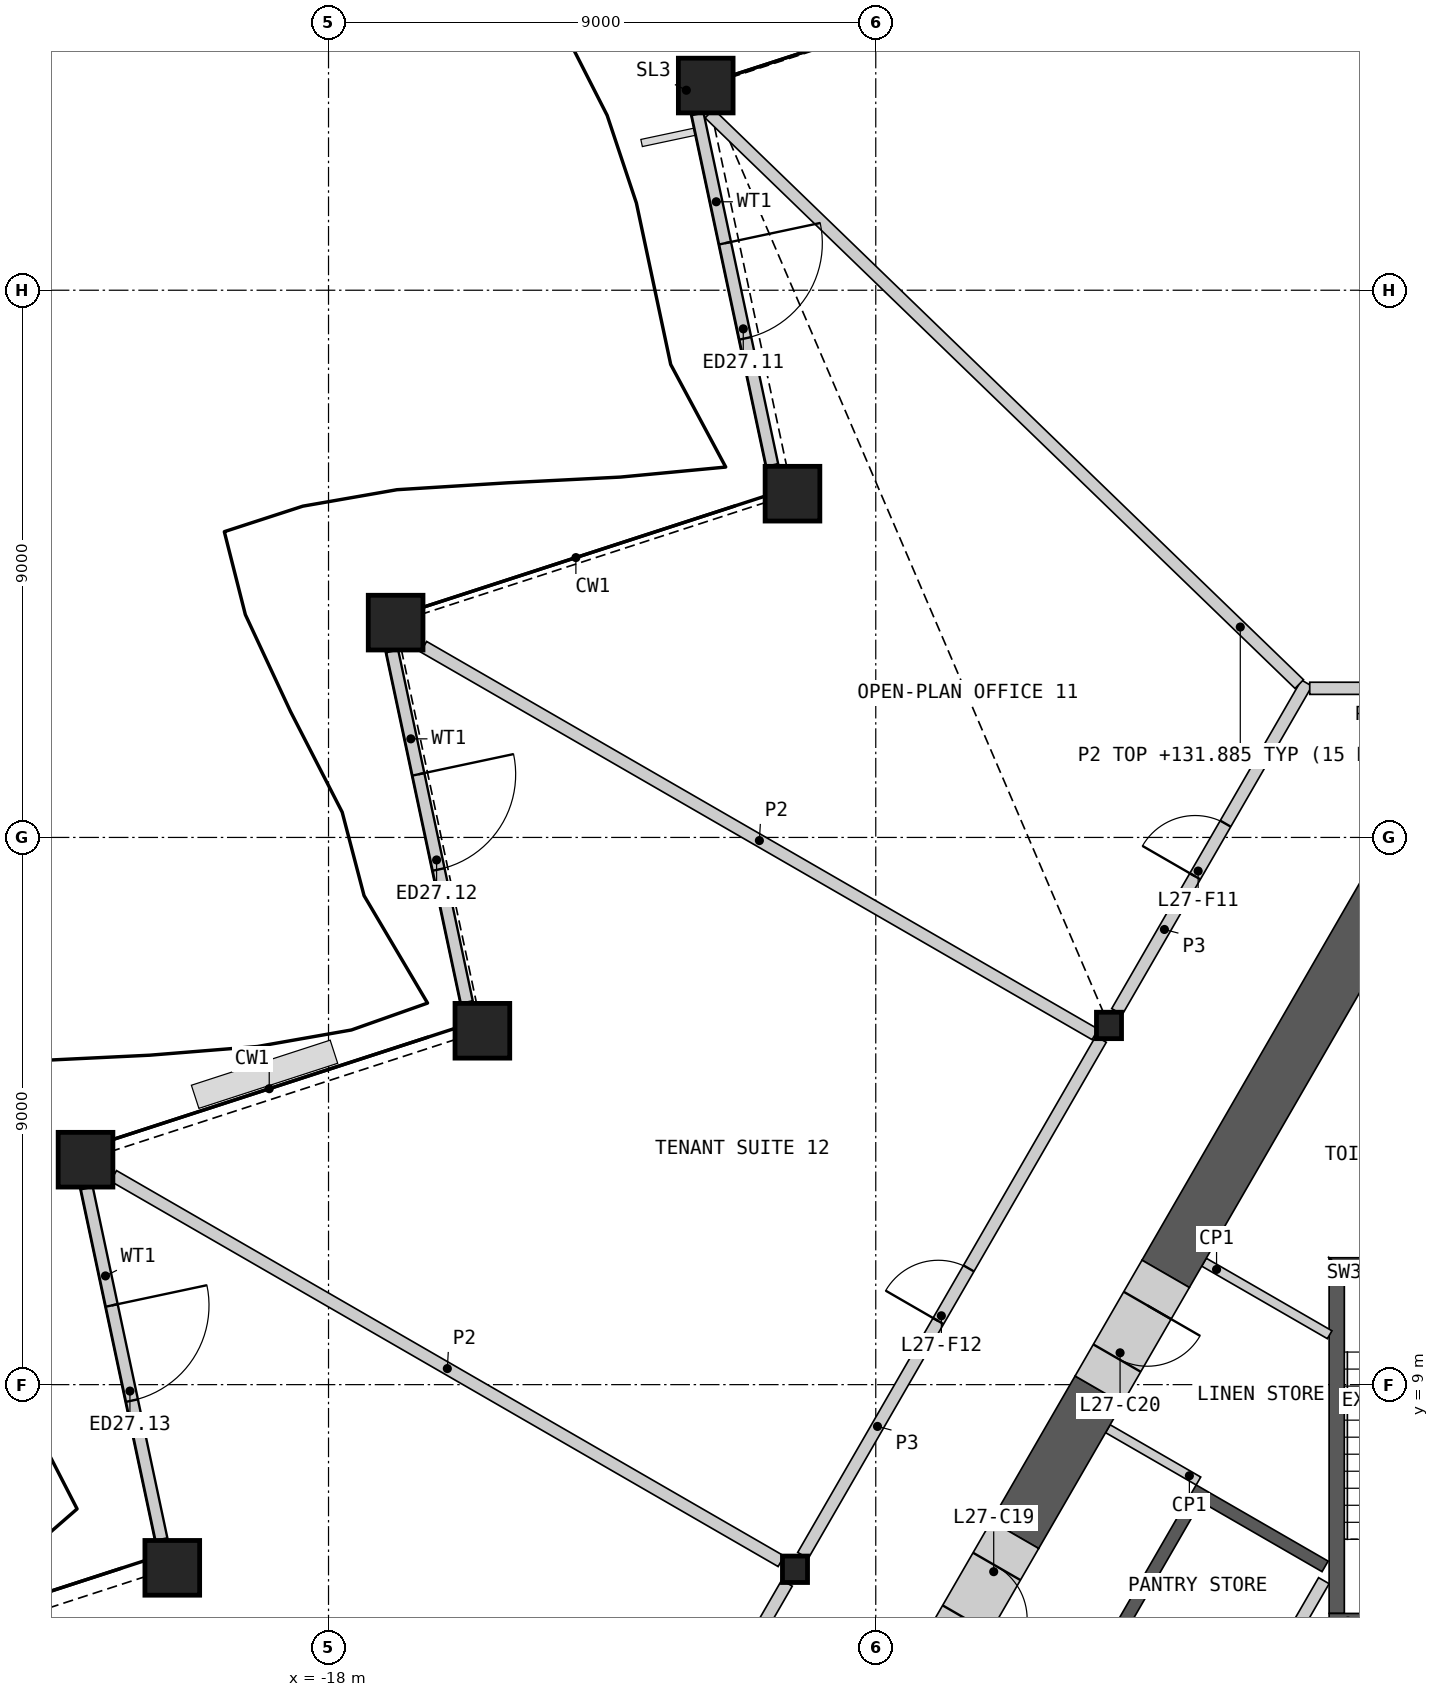
"""IFC4 building model, lengths in metres.
Left out: names, types, materials, properties, quantities, classifications, styles, units other than length and angle.
Written with IfcOpenShell. Run it as: python <this file> out.ifc"""

import sys

from ifc_helpers import new_model, si_unit, direction, frame, frame_2d, origin, origin_2d, place, context, subcontext, project, spatial, polyline, rectangle, hollow_rectangle, i_section, outline, extrude, element, fill, save


model = new_model("IFC4")
c1 = context("Model", 3, precision=1e-05, world=origin(), true_north=direction((0.0, 1.0)))
c2 = subcontext(c1, "Body", "Model", "MODEL_VIEW")
j1 = project(units=[si_unit("LENGTHUNIT", "METRE"), si_unit("PLANEANGLEUNIT", "RADIAN")], contexts=[c1])
p1 = place(None, origin())
s1 = spatial("IfcSite", under=j1, at=p1, CompositionType="ELEMENT")
p2 = place(p1, origin())
s2 = spatial("IfcBuilding", under=s1, at=p2, CompositionType="ELEMENT")
p3 = place(p2, frame((0.0, 0.0, 129.0)))
s3 = spatial("IfcBuildingStorey", under=s2, at=p3, CompositionType="ELEMENT", Elevation=129.0)
for number, where, z_axis, x_axis in (
    (1, (-11.796, 30.366, 0.0), (0.0, 0.0, 1.0), (1.0, 0.0, 0.0)),
    (2, (-10.37, 23.654, 0.0), (0.0, 0.0, 1.0), (1.0, 0.0, 0.0)),
    (3, (-16.896, 21.533, 0.0), (0.0, 0.0, 1.0), (1.0, 0.0, 0.0)),
    (4, (-15.469, 14.82, 0.0), (0.0, 0.0, 1.0), (1.0, 0.0, 0.0)),
    (5, (-21.996, 12.699, 0.0), (0.0, 0.0, 1.0), (1.0, 0.0, 0.0)),
    (6, (-20.57, 5.987, 0.0), (0.0, 0.0, 1.0), (1.0, 0.0, 0.0)),
):
    element("IfcColumn", number, at=place(p3, frame(where, z_axis=z_axis, x_axis=x_axis)), inside=s3, PredefinedType="COLUMN", context=c2, shape_type="SweptSolid", body=[
        extrude(hollow_rectangle(XDim=0.9, YDim=0.9, WallThickness=0.06, at=origin_2d()), origin(), (0.0, 0.0, 1.0), 4.2),
    ])
for number, where, z_axis, x_axis in (
    (7, (-5.164, 14.908, 0.0), (0.0, 0.0, 1.0), (1.0, 0.0, 0.0)),
    (8, (-10.328, 5.963, 0.0), (0.0, 0.0, 1.0), (1.0, 0.0, 0.0)),
):
    element("IfcColumn", number, at=place(p3, frame(where, z_axis=z_axis, x_axis=x_axis)), inside=s3, PredefinedType="COLUMN", context=c2, shape_type="SweptSolid", body=[
        extrude(i_section(OverallWidth=0.412, OverallDepth=0.435, WebThickness=0.036, FlangeThickness=0.057, at=origin_2d()), origin(), (0.0, 0.0, 1.0), 4.2),
    ])
p4 = place(p3, frame((-11.93, 29.9, 0.0), z_axis=(0.0, 0.0, 1.0), x_axis=(0.207917562075, -0.978146352741, 0.0)))
e9 = element("IfcWall", 9, at=p4, inside=s3, PredefinedType="SOLIDWALL", context=c2, shape_type="SweptSolid", body=[
    extrude(rectangle(XDim=5.909, YDim=0.2, at=frame_2d((2.954, 0.0))), origin(), (0.0, 0.0, 1.0), 3.189),
])
p5 = place(p4, frame((2.174, 0.0, 0.0)))
e10 = element("IfcOpeningElement", 10, at=p5, cuts=e9, PredefinedType="OPENING", context=c2, shape_type="SweptSolid", body=[
    extrude(rectangle(XDim=1.6, YDim=2.4, at=frame_2d((0.8, 1.2))), frame((0.0, 0.11, 0.0), z_axis=(0.0, -1.0, 0.0), x_axis=(1.0, 0.0, 0.0)), (0.0, 0.0, 1.0), 0.22),
])
p6 = place(p3, frame((-16.953, 21.066, 0.0), z_axis=(0.0, 0.0, 1.0), x_axis=(0.207917562075, -0.978146352741, 0.0)))
e11 = element("IfcWall", 11, at=p6, inside=s3, PredefinedType="SOLIDWALL", context=c2, shape_type="SweptSolid", body=[
    extrude(rectangle(XDim=5.909, YDim=0.2, at=frame_2d((2.954, 0.0))), origin(), (0.0, 0.0, 1.0), 3.189),
])
p7 = place(p6, frame((2.073, 0.0, 0.0)))
e12 = element("IfcOpeningElement", 12, at=p7, cuts=e11, PredefinedType="OPENING", context=c2, shape_type="SweptSolid", body=[
    extrude(rectangle(XDim=1.6, YDim=2.4, at=frame_2d((0.8, 1.2))), frame((0.0, 0.11, 0.0), z_axis=(0.0, -1.0, 0.0), x_axis=(1.0, 0.0, 0.0)), (0.0, 0.0, 1.0), 0.22),
])
p8 = place(p3, frame((-21.976, 12.233, 0.0), z_axis=(0.0, 0.0, 1.0), x_axis=(0.207925965623, -0.978144566421, 0.0)))
e13 = element("IfcWall", 13, at=p8, inside=s3, PredefinedType="SOLIDWALL", context=c2, shape_type="SweptSolid", body=[
    extrude(rectangle(XDim=5.908, YDim=0.2, at=frame_2d((2.954, 0.0))), origin(), (0.0, 0.0, 1.0), 3.189),
])
p9 = place(p8, frame((1.973, 0.0, 0.0)))
e14 = element("IfcOpeningElement", 14, at=p9, cuts=e13, PredefinedType="OPENING", context=c2, shape_type="SweptSolid", body=[
    extrude(rectangle(XDim=1.6, YDim=2.4, at=frame_2d((0.8, 1.2))), frame((0.0, 0.11, 0.0), z_axis=(0.0, -1.0, 0.0), x_axis=(1.0, 0.0, 0.0)), (0.0, 0.0, 1.0), 0.22),
])
p10 = place(p3, origin())
e15 = element("IfcWall", 15, at=p10, inside=s3, PredefinedType="SHEAR", context=c2, shape_type="SweptSolid", body=[
    extrude(outline(polyline([(-4.96, 0.208), (-7.131, 1.461), (-3.731, 7.35), (-1.561, 6.097), (-1.66, 5.924), (-3.652, 7.074), (-5.752, 3.437), (-3.76, 2.287), (-3.861, 2.113), (-5.852, 3.263), (-6.852, 1.531), (-4.861, 0.381), (-4.96, 0.208)])), origin(), (0.0, 0.0, 1.0), 3.8),
])
p11 = place(p3, frame((-1.631, 5.776, 0.0), z_axis=(0.0, 0.0, 1.0), x_axis=(-0.499992876559, -0.866029516466, 0.0)))
e16 = element("IfcWall", 16, at=p11, inside=s3, PredefinedType="SOLIDWALL", context=c2, shape_type="SweptSolid", body=[
    extrude(rectangle(XDim=6.486, YDim=0.2, at=frame_2d((3.243, 0.0))), origin(), (0.0, 0.0, 1.0), 3.8),
])
p12 = place(p11, frame((1.537, 0.0, 0.0)))
e17 = element("IfcOpeningElement", 17, at=p12, cuts=e16, PredefinedType="OPENING", context=c2, shape_type="SweptSolid", body=[
    extrude(rectangle(XDim=0.9, YDim=2.1, at=frame_2d((0.45, 1.05))), frame((0.0, 0.11, 0.0), z_axis=(0.0, -1.0, 0.0), x_axis=(1.0, 0.0, 0.0)), (0.0, 0.0, 1.0), 0.22),
])
p13 = place(p3, origin())
e18 = element("IfcWall", 18, at=p13, inside=s3, PredefinedType="SHEAR", context=c2, shape_type="SweptSolid", body=[
    extrude(outline(polyline([(1.544, 11.087), (-1.544, 11.087), (-1.294, 10.837), (1.294, 10.837), (1.544, 11.087)])), origin(), (0.0, 0.0, 1.0), 3.8),
])
p14 = place(p3, origin())
e19 = element("IfcWall", 19, at=p14, inside=s3, PredefinedType="SHEAR", context=c2, shape_type="SweptSolid", body=[
    extrude(outline(polyline([(-1.294, 10.837), (-1.544, 11.087), (-1.544, 5.237), (-1.294, 5.237), (-1.294, 10.837)])), origin(), (0.0, 0.0, 1.0), 3.8),
])
p15 = place(p3, frame((1.544, 5.112, 0.0), z_axis=(0.0, 0.0, 1.0), x_axis=(-1.0, 0.0, 0.0)))
e20 = element("IfcWall", 20, at=p15, inside=s3, PredefinedType="SHEAR", context=c2, shape_type="SweptSolid", body=[
    extrude(rectangle(XDim=3.088, YDim=0.25, at=frame_2d((1.544, 0.0))), origin(), (0.0, 0.0, 1.0), 3.8),
])
p16 = place(p15, frame((0.994, 0.0, 0.0)))
e21 = element("IfcOpeningElement", 21, at=p16, cuts=e20, PredefinedType="OPENING", context=c2, shape_type="SweptSolid", body=[
    extrude(rectangle(XDim=1.1, YDim=2.1, at=frame_2d((0.55, 1.05))), frame((0.0, 0.135, 0.0), z_axis=(0.0, -1.0, 0.0), x_axis=(1.0, 0.0, 0.0)), (0.0, 0.0, 1.0), 0.27),
])
p17 = place(p3, frame((-3.693, 7.415, 0.0), z_axis=(0.0, 0.0, 1.0), x_axis=(-0.866024871741, 0.500000921525, 0.0)))
e22 = element("IfcWall", 22, at=p17, inside=s3, PredefinedType="PARTITIONING", context=c2, shape_type="SweptSolid", body=[
    extrude(rectangle(XDim=1.72, YDim=0.15, at=frame_2d((0.86, 0.0))), origin(), (0.0, 0.0, 1.0), 3.8),
])
p18 = place(p3, frame((-3.602, 11.014, 0.0), z_axis=(0.0, 0.0, 1.0), x_axis=(0.866011787705, -0.500023583, 0.0)))
e23 = element("IfcWall", 23, at=p18, inside=s3, PredefinedType="PARTITIONING", context=c2, shape_type="SweptSolid", body=[
    extrude(rectangle(XDim=2.386, YDim=0.15, at=frame_2d((1.193, 0.0))), origin(), (0.0, 0.0, 1.0), 3.8),
])
p19 = place(p3, frame((-0.39, 17.478, 0.0), z_axis=(0.0, 0.0, 1.0), x_axis=(-0.500010285023, -0.866019465642, 0.0)))
e24 = element("IfcWall", 24, at=p19, inside=s3, PredefinedType="SHEAR", context=c2, shape_type="SweptSolid", body=[
    extrude(rectangle(XDim=7.685, YDim=0.9, at=frame_2d((3.842, 0.0))), origin(), (0.0, 0.0, 1.0), 3.8),
])
p20 = place(p3, frame((-5.332, 8.917, 0.0), z_axis=(0.0, 0.0, 1.0), x_axis=(-0.499949934511, -0.866054307178, 0.0)))
e25 = element("IfcWall", 25, at=p20, inside=s3, PredefinedType="SHEAR", context=c2, shape_type="SweptSolid", body=[
    extrude(rectangle(XDim=2.756, YDim=0.9, at=frame_2d((1.378, 0.0))), origin(), (0.0, 0.0, 1.0), 3.8),
])
p21 = place(p3, frame((-6.71, 6.53, 0.0), z_axis=(0.0, 0.0, 1.0), x_axis=(-0.50002983664, -0.866008176907, 0.0)))
e26 = element("IfcWall", 26, at=p21, inside=s3, PredefinedType="SHEAR", context=c2, shape_type="SweptSolid", body=[
    extrude(rectangle(XDim=2.2, YDim=0.9, at=frame_2d((1.1, 0.0))), origin(), (0.0, 0.0, 1.0), 3.8),
])
p22 = place(p21, frame((0.6, 0.0, 0.0)))
e27 = element("IfcOpeningElement", 27, at=p22, cuts=e26, PredefinedType="OPENING", context=c2, shape_type="SweptSolid", body=[
    extrude(rectangle(XDim=1.0, YDim=2.1, at=frame_2d((0.5, 1.05))), frame((0.0, 0.46, 0.0), z_axis=(0.0, -1.0, 0.0), x_axis=(1.0, 0.0, 0.0)), (0.0, 0.0, 1.0), 0.92),
])
p23 = place(p3, frame((-4.232, 10.822, 0.0), z_axis=(0.0, 0.0, 1.0), x_axis=(-0.50002983664, -0.866008176907, 0.0)))
e28 = element("IfcWall", 28, at=p23, inside=s3, PredefinedType="SHEAR", context=c2, shape_type="SweptSolid", body=[
    extrude(rectangle(XDim=2.2, YDim=0.9, at=frame_2d((1.1, 0.0))), origin(), (0.0, 0.0, 1.0), 3.8),
])
p24 = place(p23, frame((0.6, 0.0, 0.0)))
e29 = element("IfcOpeningElement", 29, at=p24, cuts=e28, PredefinedType="OPENING", context=c2, shape_type="SweptSolid", body=[
    extrude(rectangle(XDim=1.0, YDim=2.1, at=frame_2d((0.5, 1.05))), frame((0.0, 0.46, 0.0), z_axis=(0.0, -1.0, 0.0), x_axis=(1.0, 0.0, 0.0)), (0.0, 0.0, 1.0), 0.92),
])
p25 = place(p3, frame((-15.361, -2.754, 0.0), z_axis=(0.0, 0.0, 1.0), x_axis=(0.500004141693, 0.866023012564, 0.0)))
e30 = element("IfcWall", 30, at=p25, inside=s3, PredefinedType="PARTITIONING", context=c2, shape_type="SweptSolid", body=[
    extrude(rectangle(XDim=9.803, YDim=0.2, at=frame_2d((4.902, 0.0))), origin(), (0.0, 0.0, 1.0), 3.8),
])
p26 = place(p25, frame((4.452, 0.0, 0.0)))
e31 = element("IfcOpeningElement", 31, at=p26, cuts=e30, PredefinedType="OPENING", context=c2, shape_type="SweptSolid", body=[
    extrude(rectangle(XDim=1.0, YDim=2.1, at=frame_2d((0.5, 1.05))), frame((0.0, 0.11, 0.0), z_axis=(0.0, -1.0, 0.0), x_axis=(1.0, 0.0, 0.0)), (0.0, 0.0, 1.0), 0.22),
])
p27 = place(p3, frame((-10.197, 6.19, 0.0), z_axis=(0.0, 0.0, 1.0), x_axis=(0.500012035596, 0.866018454918, 0.0)))
e32 = element("IfcWall", 32, at=p27, inside=s3, PredefinedType="PARTITIONING", context=c2, shape_type="SweptSolid", body=[
    extrude(rectangle(XDim=9.803, YDim=0.2, at=frame_2d((4.902, 0.0))), origin(), (0.0, 0.0, 1.0), 3.8),
])
p28 = place(p27, frame((4.452, 0.0, 0.0)))
e33 = element("IfcOpeningElement", 33, at=p28, cuts=e32, PredefinedType="OPENING", context=c2, shape_type="SweptSolid", body=[
    extrude(rectangle(XDim=1.0, YDim=2.1, at=frame_2d((0.5, 1.05))), frame((0.0, 0.11, 0.0), z_axis=(0.0, -1.0, 0.0), x_axis=(1.0, 0.0, 0.0)), (0.0, 0.0, 1.0), 0.22),
])
p29 = place(p3, frame((-5.033, 15.135, 0.0), z_axis=(0.0, 0.0, 1.0), x_axis=(0.499980978912, 0.866036385336, 0.0)))
e34 = element("IfcWall", 34, at=p29, inside=s3, PredefinedType="PARTITIONING", context=c2, shape_type="SweptSolid", body=[
    extrude(rectangle(XDim=6.24, YDim=0.2, at=frame_2d((3.12, 0.0))), origin(), (0.0, 0.0, 1.0), 3.8),
])
p30 = place(p29, frame((2.57, 0.0, 0.0)))
e35 = element("IfcOpeningElement", 35, at=p30, cuts=e34, PredefinedType="OPENING", context=c2, shape_type="SweptSolid", body=[
    extrude(rectangle(XDim=1.0, YDim=2.1, at=frame_2d((0.5, 1.05))), frame((0.0, 0.11, 0.0), z_axis=(0.0, -1.0, 0.0), x_axis=(1.0, 0.0, 0.0)), (0.0, 0.0, 1.0), 0.22),
])
p31 = place(p3, frame((-1.863, 20.453, 0.0), z_axis=(0.0, 0.0, 1.0), x_axis=(1.0, 0.0, 0.0)))
e36 = element("IfcWall", 36, at=p31, inside=s3, PredefinedType="PARTITIONING", context=c2, shape_type="SweptSolid", body=[
    extrude(rectangle(XDim=3.726, YDim=0.2, at=frame_2d((1.863, 0.0))), origin(), (0.0, 0.0, 1.0), 3.8),
])
p32 = place(p31, frame((0.963, 0.0, 0.0)))
e37 = element("IfcOpeningElement", 37, at=p32, cuts=e36, PredefinedType="OPENING", context=c2, shape_type="SweptSolid", body=[
    extrude(rectangle(XDim=1.8, YDim=2.1, at=frame_2d((0.9, 1.05))), frame((0.0, 0.11, 0.0), z_axis=(0.0, -1.0, 0.0), x_axis=(1.0, 0.0, 0.0)), (0.0, 0.0, 1.0), 0.22),
])
p33 = place(p3, frame((-11.737, 29.906, 0.0), z_axis=(0.0, 0.0, 1.0), x_axis=(0.718783474817, -0.695234001132, 0.0)))
e38 = element("IfcWall", 38, at=p33, inside=s3, PredefinedType="PARTITIONING", context=c2, shape_type="SweptSolid", body=[
    extrude(rectangle(XDim=13.498, YDim=0.2, at=frame_2d((6.749, 0.0))), origin(), (0.0, 0.0, 1.0), 2.885),
])
p34 = place(p3, frame((-16.436, 21.137, 0.0), z_axis=(0.0, 0.0, 1.0), x_axis=(0.866023321739, -0.500003606191, 0.0)))
e39 = element("IfcWall", 39, at=p34, inside=s3, PredefinedType="PARTITIONING", context=c2, shape_type="SweptSolid", body=[
    extrude(rectangle(XDim=12.753, YDim=0.2, at=frame_2d((6.377, 0.0))), origin(), (0.0, 0.0, 1.0), 2.885),
])
p35 = place(p3, frame((-21.536, 12.434, 0.0), z_axis=(0.0, 0.0, 1.0), x_axis=(0.86602461759, -0.500001361726, 0.0)))
e40 = element("IfcWall", 40, at=p35, inside=s3, PredefinedType="PARTITIONING", context=c2, shape_type="SweptSolid", body=[
    extrude(rectangle(XDim=12.679, YDim=0.2, at=frame_2d((6.34, 0.0))), origin(), (0.0, 0.0, 1.0), 2.885),
])
p36 = place(p5, origin())
e41 = element("IfcDoor", 41, at=p36, inside=s3, OperationType="DOUBLE_DOOR_SINGLE_SWING", PredefinedType="DOOR", context=c2, shape_type="SweptSolid", body=[
    extrude(rectangle(XDim=1.6, YDim=2.4, at=frame_2d((0.8, 1.2))), frame((0.0, 0.025, 0.0), z_axis=(0.0, -1.0, 0.0), x_axis=(1.0, 0.0, 0.0)), (0.0, 0.0, 1.0), 0.05),
])
fill(e10, e41)
p37 = place(p7, origin())
e42 = element("IfcDoor", 42, at=p37, inside=s3, OperationType="DOUBLE_DOOR_SINGLE_SWING", PredefinedType="DOOR", context=c2, shape_type="SweptSolid", body=[
    extrude(rectangle(XDim=1.6, YDim=2.4, at=frame_2d((0.8, 1.2))), frame((0.0, 0.025, 0.0), z_axis=(0.0, -1.0, 0.0), x_axis=(1.0, 0.0, 0.0)), (0.0, 0.0, 1.0), 0.05),
])
fill(e12, e42)
p38 = place(p9, origin())
e43 = element("IfcDoor", 43, at=p38, inside=s3, OperationType="DOUBLE_DOOR_SINGLE_SWING", PredefinedType="DOOR", context=c2, shape_type="SweptSolid", body=[
    extrude(rectangle(XDim=1.6, YDim=2.4, at=frame_2d((0.8, 1.2))), frame((0.0, 0.025, 0.0), z_axis=(0.0, -1.0, 0.0), x_axis=(1.0, 0.0, 0.0)), (0.0, 0.0, 1.0), 0.05),
])
fill(e14, e43)
p39 = place(p22, origin())
e44 = element("IfcDoor", 44, at=p39, inside=s3, OperationType="SINGLE_SWING_RIGHT", PredefinedType="DOOR", context=c2, shape_type="SweptSolid", body=[
    extrude(rectangle(XDim=1.0, YDim=2.1, at=frame_2d((0.5, 1.05))), frame((0.0, 0.205, 0.0), z_axis=(0.0, -1.0, 0.0), x_axis=(1.0, 0.0, 0.0)), (0.0, 0.0, 1.0), 0.05),
])
fill(e27, e44)
p40 = place(p24, origin())
e45 = element("IfcDoor", 45, at=p40, inside=s3, OperationType="SINGLE_SWING_LEFT", PredefinedType="DOOR", context=c2, shape_type="SweptSolid", body=[
    extrude(rectangle(XDim=1.0, YDim=2.1, at=frame_2d((0.5, 1.05))), frame((0.0, 0.205, 0.0), z_axis=(0.0, -1.0, 0.0), x_axis=(1.0, 0.0, 0.0)), (0.0, 0.0, 1.0), 0.05),
])
fill(e29, e45)
p41 = place(p30, origin())
e46 = element("IfcDoor", 46, at=p41, inside=s3, OperationType="SINGLE_SWING_LEFT", PredefinedType="DOOR", context=c2, shape_type="SweptSolid", body=[
    extrude(rectangle(XDim=1.0, YDim=2.1, at=frame_2d((0.5, 1.05))), frame((0.0, 0.025, 0.0), z_axis=(0.0, -1.0, 0.0), x_axis=(1.0, 0.0, 0.0)), (0.0, 0.0, 1.0), 0.05),
])
fill(e35, e46)
p42 = place(p28, origin())
e47 = element("IfcDoor", 47, at=p42, inside=s3, OperationType="SINGLE_SWING_LEFT", PredefinedType="DOOR", context=c2, shape_type="SweptSolid", body=[
    extrude(rectangle(XDim=1.0, YDim=2.1, at=frame_2d((0.5, 1.05))), frame((0.0, 0.025, 0.0), z_axis=(0.0, -1.0, 0.0), x_axis=(1.0, 0.0, 0.0)), (0.0, 0.0, 1.0), 0.05),
])
fill(e33, e47)
save(model, sys.argv[1])
